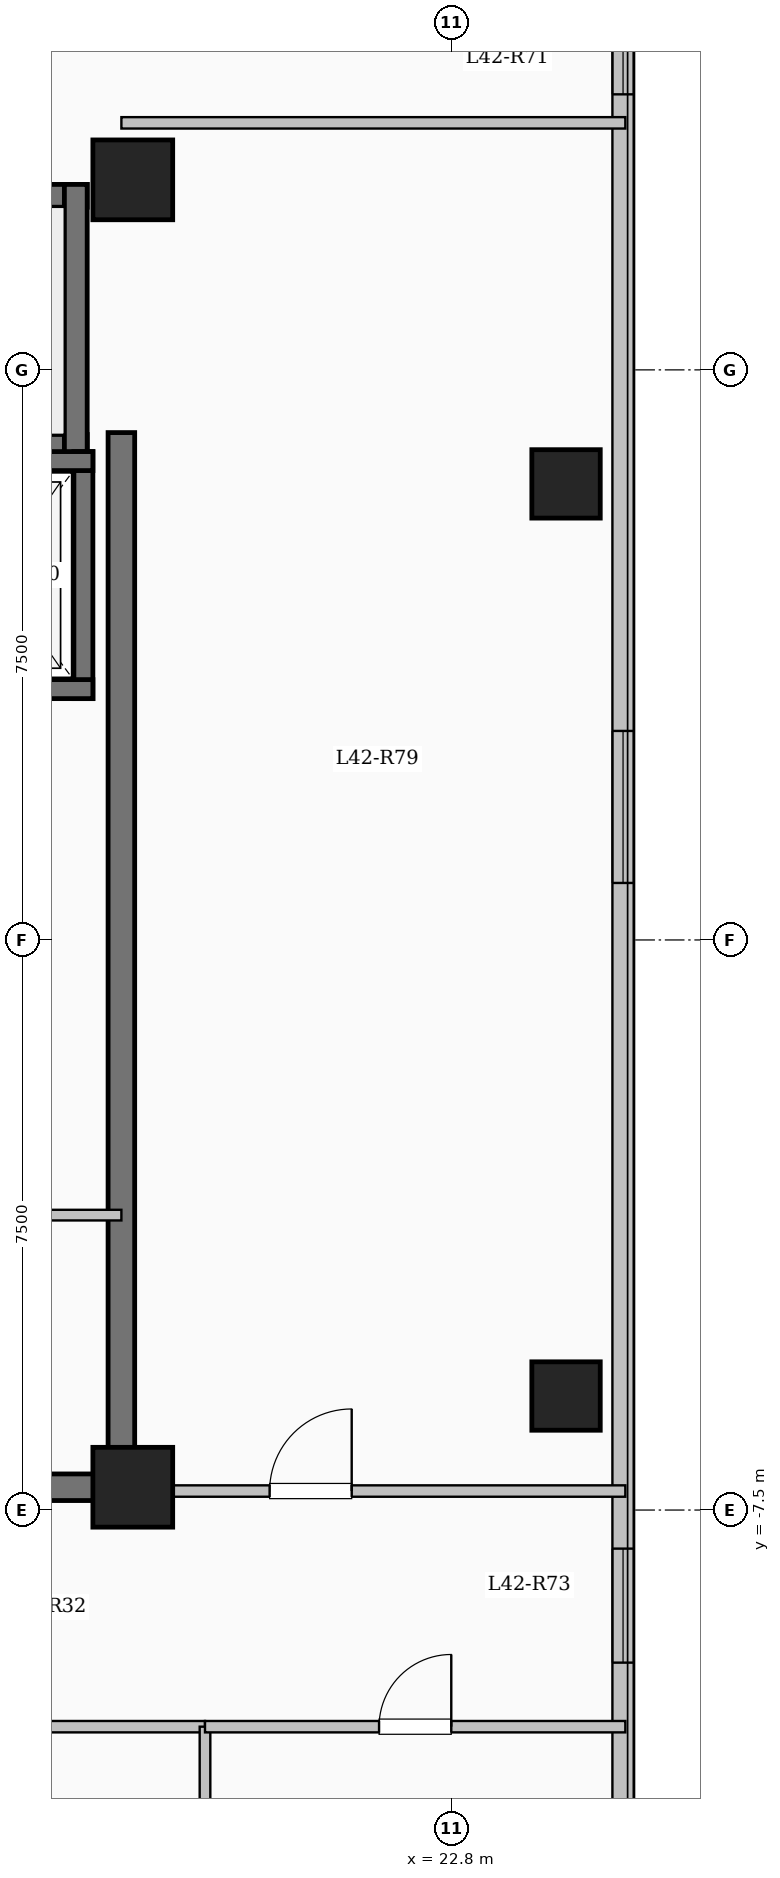
"""IFC4 building model, lengths in metres.
Left out: names, types, materials, properties, quantities, classifications, styles, units other than length and angle.
Written with IfcOpenShell. Run it as: python <this file> out.ifc"""

import sys

from ifc_helpers import new_model, si_unit, direction, frame, frame_2d, origin, origin_2d, place, context, subcontext, project, spatial, rectangle, extrude, element, fill, save


model = new_model("IFC4")
c1 = context("Model", 3, precision=1e-05, world=origin(), true_north=direction((0.0, 1.0)))
c2 = subcontext(c1, "Body", "Model", "MODEL_VIEW")
j1 = project(units=[si_unit("LENGTHUNIT", "METRE"), si_unit("PLANEANGLEUNIT", "RADIAN")], contexts=[c1])
p1 = place(None, origin())
s1 = spatial("IfcSite", under=j1, at=p1, CompositionType="ELEMENT")
p2 = place(p1, origin())
s2 = spatial("IfcBuilding", under=s1, at=p2, CompositionType="ELEMENT")
p3 = place(p2, frame((0.0, 0.0, 156.05)))
s3 = spatial("IfcBuildingStorey", under=s2, at=p3, CompositionType="ELEMENT", Elevation=156.05)
for number, where, z_axis, x_axis in (
    (1, (18.6, -7.2, 0.0), (0.0, 0.0, 1.0), (1.0, 0.0, 0.0)),
    (2, (18.6, 10.0, 0.0), (0.0, 0.0, 1.0), (1.0, 0.0, 0.0)),
):
    element("IfcColumn", number, at=place(p3, frame(where, z_axis=z_axis, x_axis=x_axis)), inside=s3, PredefinedType="COLUMN", context=c2, shape_type="SweptSolid", body=[
        extrude(rectangle(XDim=1.05, YDim=1.05, at=origin_2d()), origin(), (0.0, 0.0, 1.0), 3.35),
    ])
for number, where, z_axis, x_axis in (
    (3, (24.3, -6.0, 0.0), (0.0, 0.0, 1.0), (1.0, 0.0, 0.0)),
    (4, (24.3, 6.0, 0.0), (0.0, 0.0, 1.0), (1.0, 0.0, 0.0)),
):
    element("IfcColumn", number, at=place(p3, frame(where, z_axis=z_axis, x_axis=x_axis)), inside=s3, PredefinedType="COLUMN", context=c2, shape_type="SweptSolid", body=[
        extrude(rectangle(XDim=0.9, YDim=0.9, at=origin_2d()), origin(), (0.0, 0.0, 1.0), 3.35),
    ])
p4 = place(p3, frame((25.05, 17.25, 0.0), z_axis=(0.0, 0.0, 1.0), x_axis=(0.0, -1.0, 0.0)))
e5 = element("IfcWall", 5, at=p4, inside=s3, PredefinedType="SOLIDWALL", context=c2, shape_type="SweptSolid", body=[
    extrude(rectangle(XDim=34.5, YDim=0.28, at=frame_2d((17.25, 0.0))), origin(), (0.0, 0.0, 1.0), 3.1),
])
p5 = place(p4, frame((1.375, 0.0, 0.9)))
e6 = element("IfcOpeningElement", 6, at=p5, cuts=e5, PredefinedType="OPENING", context=c2, shape_type="SweptSolid", body=[
    extrude(rectangle(XDim=2.0, YDim=1.7, at=frame_2d((1.0, 0.85))), frame((0.0, 0.15, 0.0), z_axis=(0.0, -1.0, 0.0), x_axis=(1.0, 0.0, 0.0)), (0.0, 0.0, 1.0), 0.3),
])
p6 = place(p4, frame((5.125, 0.0, 0.95)))
e7 = element("IfcOpeningElement", 7, at=p6, cuts=e5, PredefinedType="OPENING", context=c2, shape_type="SweptSolid", body=[
    extrude(rectangle(XDim=1.0, YDim=1.5, at=frame_2d((0.5, 0.75))), frame((0.0, 0.15, 0.0), z_axis=(0.0, -1.0, 0.0), x_axis=(1.0, 0.0, 0.0)), (0.0, 0.0, 1.0), 0.3),
])
p7 = place(p4, frame((14.5, 0.0, 0.9)))
e8 = element("IfcOpeningElement", 8, at=p7, cuts=e5, PredefinedType="OPENING", context=c2, shape_type="SweptSolid", body=[
    extrude(rectangle(XDim=2.0, YDim=1.7, at=frame_2d((1.0, 0.85))), frame((0.0, 0.15, 0.0), z_axis=(0.0, -1.0, 0.0), x_axis=(1.0, 0.0, 0.0)), (0.0, 0.0, 1.0), 0.3),
])
p8 = place(p4, frame((25.258, 0.0, 0.9)))
e9 = element("IfcOpeningElement", 9, at=p8, cuts=e5, PredefinedType="OPENING", context=c2, shape_type="SweptSolid", body=[
    extrude(rectangle(XDim=1.5, YDim=1.65, at=frame_2d((0.75, 0.825))), frame((0.0, 0.15, 0.0), z_axis=(0.0, -1.0, 0.0), x_axis=(1.0, 0.0, 0.0)), (0.0, 0.0, 1.0), 0.3),
])
p9 = place(p4, frame((29.95, 0.0, 0.9)))
e10 = element("IfcOpeningElement", 10, at=p9, cuts=e5, PredefinedType="OPENING", context=c2, shape_type="SweptSolid", body=[
    extrude(rectangle(XDim=2.2, YDim=1.75, at=frame_2d((1.1, 0.875))), frame((0.0, 0.15, 0.0), z_axis=(0.0, -1.0, 0.0), x_axis=(1.0, 0.0, 0.0)), (0.0, 0.0, 1.0), 0.3),
])
p10 = place(p3, frame((10.0, 9.79, 0.0), z_axis=(0.0, 0.0, 1.0), x_axis=(1.0, 0.0, 0.0)))
e11 = element("IfcWall", 11, at=p10, inside=s3, PredefinedType="SHEAR", context=c2, shape_type="SweptSolid", body=[
    extrude(rectangle(XDim=8.0, YDim=0.3, at=frame_2d((4.0, 0.0))), origin(), (0.0, 0.0, 1.0), 3.35),
])
p11 = place(p3, frame((10.0, 6.5, 0.0), z_axis=(0.0, 0.0, 1.0), x_axis=(1.0, 0.0, 0.0)))
e12 = element("IfcWall", 12, at=p11, inside=s3, PredefinedType="SHEAR", context=c2, shape_type="SweptSolid", body=[
    extrude(rectangle(XDim=8.0, YDim=0.3, at=frame_2d((4.0, 0.0))), origin(), (0.0, 0.0, 1.0), 3.35),
])
p12 = place(p11, frame((0.55, 0.0, 0.0)))
e13 = element("IfcOpeningElement", 13, at=p12, cuts=e12, PredefinedType="OPENING", context=c2, shape_type="SweptSolid", body=[
    extrude(rectangle(XDim=1.0, YDim=2.15, at=frame_2d((0.5, 1.075))), frame((0.0, 0.16, 0.0), z_axis=(0.0, -1.0, 0.0), x_axis=(1.0, 0.0, 0.0)), (0.0, 0.0, 1.0), 0.32),
])
p13 = place(p3, frame((17.85, 6.35, 0.0), z_axis=(0.0, 0.0, 1.0), x_axis=(0.0, 1.0, 0.0)))
e14 = element("IfcWall", 14, at=p13, inside=s3, PredefinedType="SHEAR", context=c2, shape_type="SweptSolid", body=[
    extrude(rectangle(XDim=3.59, YDim=0.3, at=frame_2d((1.795, 0.0))), origin(), (0.0, 0.0, 1.0), 3.35),
])
p14 = place(p3, frame((17.95, 3.175, 0.0), z_axis=(0.0, 0.0, 1.0), x_axis=(0.0, 1.0, 0.0)))
e15 = element("IfcWall", 15, at=p14, inside=s3, PredefinedType="SHEAR", context=c2, shape_type="SweptSolid", body=[
    extrude(rectangle(XDim=3.25, YDim=0.25, at=frame_2d((1.625, 0.0))), origin(), (0.0, 0.0, 1.0), 3.35),
])
for number, where, z_axis, x_axis in (
    (16, (15.525, 3.3, 0.0), (0.0, 0.0, 1.0), (1.0, 0.0, 0.0)),
    (17, (15.525, 6.3, 0.0), (0.0, 0.0, 1.0), (1.0, 0.0, 0.0)),
):
    element("IfcWall", number, at=place(p3, frame(where, z_axis=z_axis, x_axis=x_axis)), inside=s3, PredefinedType="SHEAR", context=c2, shape_type="SweptSolid", body=[
        extrude(rectangle(XDim=2.55, YDim=0.25, at=frame_2d((1.275, 0.0))), origin(), (0.0, 0.0, 1.0), 3.35),
    ])
p15 = place(p3, frame((18.45, -7.375, 0.0), z_axis=(0.0, 0.0, 1.0), x_axis=(0.0, 1.0, 0.0)))
e18 = element("IfcWall", 18, at=p15, inside=s3, PredefinedType="SHEAR", context=c2, shape_type="SweptSolid", body=[
    extrude(rectangle(XDim=14.05, YDim=0.35, at=frame_2d((7.025, 0.0))), origin(), (0.0, 0.0, 1.0), 3.35),
])
p16 = place(p3, frame((10.075, -7.2, 0.0), z_axis=(0.0, 0.0, 1.0), x_axis=(1.0, 0.0, 0.0)))
e19 = element("IfcWall", 19, at=p16, inside=s3, PredefinedType="SHEAR", context=c2, shape_type="SweptSolid", body=[
    extrude(rectangle(XDim=8.55, YDim=0.35, at=frame_2d((4.275, 0.0))), origin(), (0.0, 0.0, 1.0), 3.35),
])
p17 = place(p3, frame((15.4, -3.62, 0.0), z_axis=(0.0, 0.0, 1.0), x_axis=(1.0, 0.0, 0.0)))
e20 = element("IfcWall", 20, at=p17, inside=s3, PredefinedType="PARTITIONING", context=c2, shape_type="SweptSolid", body=[
    extrude(rectangle(XDim=3.05, YDim=0.14, at=frame_2d((1.525, 0.0))), origin(), (0.0, 0.0, 1.0), 3.1),
])
p18 = place(p17, frame((1.05, 0.0, 0.0)))
e21 = element("IfcOpeningElement", 21, at=p18, cuts=e20, PredefinedType="OPENING", context=c2, shape_type="SweptSolid", body=[
    extrude(rectangle(XDim=0.9, YDim=2.08, at=frame_2d((0.45, 1.04))), frame((0.0, 0.08, 0.0), z_axis=(0.0, -1.0, 0.0), x_axis=(1.0, 0.0, 0.0)), (0.0, 0.0, 1.0), 0.16),
])
p19 = place(p3, frame((8.55, -10.35, 0.0), z_axis=(0.0, 0.0, 1.0), x_axis=(1.0, 0.0, 0.0)))
e22 = element("IfcWall", 22, at=p19, inside=s3, PredefinedType="PARTITIONING", context=c2, shape_type="SweptSolid", body=[
    extrude(rectangle(XDim=11.0, YDim=0.15, at=frame_2d((5.5, 0.0))), origin(), (0.0, 0.0, 1.0), 3.1),
])
p20 = place(p19, frame((0.75, 0.0, 0.0)))
e23 = element("IfcOpeningElement", 23, at=p20, cuts=e22, PredefinedType="OPENING", context=c2, shape_type="SweptSolid", body=[
    extrude(rectangle(XDim=0.96, YDim=2.15, at=frame_2d((0.48, 1.075))), frame((0.0, 0.085, 0.0), z_axis=(0.0, -1.0, 0.0), x_axis=(1.0, 0.0, 0.0)), (0.0, 0.0, 1.0), 0.17),
])
p21 = place(p19, frame((6.006, 0.0, 0.0)))
e24 = element("IfcOpeningElement", 24, at=p21, cuts=e22, PredefinedType="OPENING", context=c2, shape_type="SweptSolid", body=[
    extrude(rectangle(XDim=0.96, YDim=2.15, at=frame_2d((0.48, 1.075))), frame((0.0, 0.085, 0.0), z_axis=(0.0, -1.0, 0.0), x_axis=(1.0, 0.0, 0.0)), (0.0, 0.0, 1.0), 0.17),
])
p22 = place(p3, frame((18.45, -7.25, 0.0), z_axis=(0.0, 0.0, 1.0), x_axis=(1.0, 0.0, 0.0)))
e25 = element("IfcWall", 25, at=p22, inside=s3, PredefinedType="PARTITIONING", context=c2, shape_type="SweptSolid", body=[
    extrude(rectangle(XDim=6.63, YDim=0.15, at=frame_2d((3.315, 0.0))), origin(), (0.0, 0.0, 1.0), 3.1),
])
p23 = place(p22, frame((1.95, 0.0, 0.0)))
e26 = element("IfcOpeningElement", 26, at=p23, cuts=e25, PredefinedType="OPENING", context=c2, shape_type="SweptSolid", body=[
    extrude(rectangle(XDim=1.08, YDim=2.15, at=frame_2d((0.54, 1.075))), frame((0.0, 0.085, 0.0), z_axis=(0.0, -1.0, 0.0), x_axis=(1.0, 0.0, 0.0)), (0.0, 0.0, 1.0), 0.17),
])
p24 = place(p3, frame((18.45, 10.75, 0.0), z_axis=(0.0, 0.0, 1.0), x_axis=(1.0, 0.0, 0.0)))
e27 = element("IfcWall", 27, at=p24, inside=s3, PredefinedType="PARTITIONING", context=c2, shape_type="SweptSolid", body=[
    extrude(rectangle(XDim=6.63, YDim=0.15, at=frame_2d((3.315, 0.0))), origin(), (0.0, 0.0, 1.0), 3.1),
])
p25 = place(p3, frame((19.55, -17.25, 0.0), z_axis=(0.0, 0.0, 1.0), x_axis=(0.0, 1.0, 0.0)))
e28 = element("IfcWall", 28, at=p25, inside=s3, PredefinedType="PARTITIONING", context=c2, shape_type="SweptSolid", body=[
    extrude(rectangle(XDim=6.9, YDim=0.14, at=frame_2d((3.45, 0.0))), origin(), (0.0, 0.0, 1.0), 3.1),
])
p26 = place(p3, frame((19.55, -10.35, 0.0), z_axis=(0.0, 0.0, 1.0), x_axis=(1.0, 0.0, 0.0)))
e29 = element("IfcWall", 29, at=p26, inside=s3, PredefinedType="PARTITIONING", context=c2, shape_type="SweptSolid", body=[
    extrude(rectangle(XDim=5.53, YDim=0.15, at=frame_2d((2.765, 0.0))), origin(), (0.0, 0.0, 1.0), 3.1),
])
p27 = place(p26, frame((2.29, 0.0, 0.0)))
e30 = element("IfcOpeningElement", 30, at=p27, cuts=e29, PredefinedType="OPENING", context=c2, shape_type="SweptSolid", body=[
    extrude(rectangle(XDim=0.95, YDim=2.15, at=frame_2d((0.475, 1.075))), frame((0.0, 0.085, 0.0), z_axis=(0.0, -1.0, 0.0), x_axis=(1.0, 0.0, 0.0)), (0.0, 0.0, 1.0), 0.17),
])
p28 = place(p6, origin())
e31 = element("IfcWindow", 31, at=p28, inside=s3, PartitioningType="SINGLE_PANEL", PredefinedType="WINDOW", context=c2, shape_type="SweptSolid", body=[
    extrude(rectangle(XDim=1.0, YDim=1.5, at=frame_2d((0.5, 0.75))), frame((0.0, 0.03, 0.0), z_axis=(0.0, -1.0, 0.0), x_axis=(1.0, 0.0, 0.0)), (0.0, 0.0, 1.0), 0.06),
])
fill(e7, e31)
p29 = place(p7, origin())
e32 = element("IfcWindow", 32, at=p29, inside=s3, PartitioningType="SINGLE_PANEL", PredefinedType="WINDOW", context=c2, shape_type="SweptSolid", body=[
    extrude(rectangle(XDim=2.0, YDim=1.7, at=frame_2d((1.0, 0.85))), frame((0.0, 0.03, 0.0), z_axis=(0.0, -1.0, 0.0), x_axis=(1.0, 0.0, 0.0)), (0.0, 0.0, 1.0), 0.06),
])
fill(e8, e32)
p30 = place(p8, origin())
e33 = element("IfcWindow", 33, at=p30, inside=s3, PartitioningType="SINGLE_PANEL", PredefinedType="WINDOW", context=c2, shape_type="SweptSolid", body=[
    extrude(rectangle(XDim=1.5, YDim=1.65, at=frame_2d((0.75, 0.825))), frame((0.0, 0.03, 0.0), z_axis=(0.0, -1.0, 0.0), x_axis=(1.0, 0.0, 0.0)), (0.0, 0.0, 1.0), 0.06),
])
fill(e9, e33)
p31 = place(p27, origin())
e34 = element("IfcDoor", 34, at=p31, inside=s3, OperationType="SINGLE_SWING_RIGHT", PredefinedType="DOOR", context=c2, shape_type="SweptSolid", body=[
    extrude(rectangle(XDim=0.95, YDim=2.15, at=frame_2d((0.475, 1.075))), frame((0.0, 0.025, 0.0), z_axis=(0.0, -1.0, 0.0), x_axis=(1.0, 0.0, 0.0)), (0.0, 0.0, 1.0), 0.05),
])
fill(e30, e34)
p32 = place(p23, origin())
e35 = element("IfcDoor", 35, at=p32, inside=s3, OperationType="SINGLE_SWING_RIGHT", PredefinedType="DOOR", context=c2, shape_type="SweptSolid", body=[
    extrude(rectangle(XDim=1.08, YDim=2.15, at=frame_2d((0.54, 1.075))), frame((0.0, 0.025, 0.0), z_axis=(0.0, -1.0, 0.0), x_axis=(1.0, 0.0, 0.0)), (0.0, 0.0, 1.0), 0.05),
])
fill(e26, e35)
save(model, sys.argv[1])
